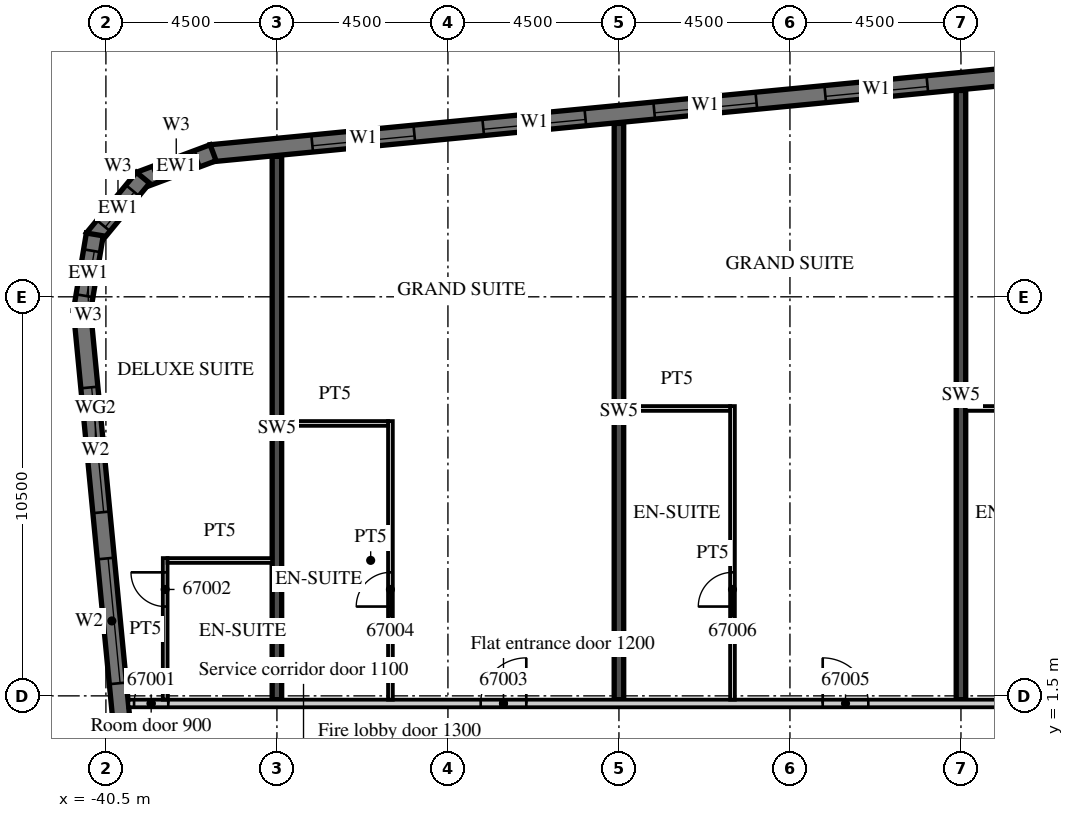
"""IFC4 building model, lengths in metres.
Left out: names, types, materials, properties, quantities, classifications, styles, units other than length and angle.
Written with IfcOpenShell. Run it as: python <this file> out.ifc"""

import sys

from ifc_helpers import new_model, si_unit, direction, frame, frame_2d, origin, place, context, subcontext, project, spatial, polyline, rectangle, outline, extrude, element, fill, save


model = new_model("IFC4")
c1 = context("Model", 3, precision=1e-05, world=origin(), true_north=direction((0.0, 1.0)))
c2 = subcontext(c1, "Body", "Model", "MODEL_VIEW")
j1 = project(units=[si_unit("LENGTHUNIT", "METRE"), si_unit("PLANEANGLEUNIT", "RADIAN")], contexts=[c1])
p1 = place(None, origin())
s1 = spatial("IfcSite", under=j1, at=p1, CompositionType="ELEMENT")
p2 = place(p1, origin())
s2 = spatial("IfcBuilding", under=s1, at=p2, CompositionType="ELEMENT")
p3 = place(p2, frame((0.0, 0.0, 271.8)))
s3 = spatial("IfcBuildingStorey", under=s2, at=p3, CompositionType="ELEMENT", Elevation=271.8)
p4 = place(p3, frame((-36.0, 1.4, 0.0), z_axis=(0.0, 0.0, 1.0), x_axis=(0.0, 1.0, 0.0)))
e1 = element("IfcWall", 1, at=p4, inside=s3, PredefinedType="SHEAR", context=c2, shape_type="SweptSolid", body=[
    extrude(rectangle(XDim=14.296, YDim=0.25, at=frame_2d((7.148, 0.0))), origin(), (0.0, 0.0, 1.0), 3.3),
])
p5 = place(p3, frame((-27.0, 1.4, 0.0), z_axis=(0.0, 0.0, 1.0), x_axis=(0.0, 1.0, 0.0)))
e2 = element("IfcWall", 2, at=p5, inside=s3, PredefinedType="SHEAR", context=c2, shape_type="SweptSolid", body=[
    extrude(rectangle(XDim=15.163, YDim=0.25, at=frame_2d((7.582, 0.0))), origin(), (0.0, 0.0, 1.0), 3.3),
])
p6 = place(p3, frame((-18.0, 1.4, 0.0), z_axis=(0.0, 0.0, 1.0), x_axis=(0.0, 1.0, 0.0)))
e3 = element("IfcWall", 3, at=p6, inside=s3, PredefinedType="SHEAR", context=c2, shape_type="SweptSolid", body=[
    extrude(rectangle(XDim=16.03, YDim=0.25, at=frame_2d((8.015, 0.0))), origin(), (0.0, 0.0, 1.0), 3.3),
])
p7 = place(p3, frame((-41.132, 11.658, 0.0), z_axis=(0.0, 0.0, 1.0), x_axis=(0.095847749461, -0.995396006082, 0.0)))
e4 = element("IfcWall", 4, at=p7, inside=s3, PredefinedType="SOLIDWALL", context=c2, shape_type="SweptSolid", body=[
    extrude(rectangle(XDim=32.0, YDim=0.45, at=frame_2d((16.0, 0.0))), origin(), (0.0, 0.0, 1.0), 3.02),
])
p8 = place(p7, frame((2.053, 0.0, 0.45)))
e5 = element("IfcOpeningElement", 5, at=p8, cuts=e4, PredefinedType="OPENING", context=c2, shape_type="SweptSolid", body=[
    extrude(rectangle(XDim=3.3, YDim=2.25, at=frame_2d((1.65, 1.125))), frame((0.0, 0.235, 0.0), z_axis=(0.0, -1.0, 0.0), x_axis=(1.0, 0.0, 0.0)), (0.0, 0.0, 1.0), 0.47),
])
p9 = place(p7, frame((6.574, 0.0, 0.45)))
e6 = element("IfcOpeningElement", 6, at=p9, cuts=e4, PredefinedType="OPENING", context=c2, shape_type="SweptSolid", body=[
    extrude(rectangle(XDim=3.3, YDim=2.25, at=frame_2d((1.65, 1.125))), frame((0.0, 0.235, 0.0), z_axis=(0.0, -1.0, 0.0), x_axis=(1.0, 0.0, 0.0)), (0.0, 0.0, 1.0), 0.47),
])
p10 = place(p3, frame((13.521, 20.713, 0.0), z_axis=(0.0, 0.0, 1.0), x_axis=(-0.995396277313, -0.095844932638, 0.0)))
e7 = element("IfcWall", 7, at=p10, inside=s3, PredefinedType="SOLIDWALL", context=c2, shape_type="SweptSolid", body=[
    extrude(rectangle(XDim=51.495, YDim=0.45, at=frame_2d((25.748, 0.0))), origin(), (0.0, 0.0, 1.0), 3.02),
])
p11 = place(p10, frame((0.91, 0.0, 0.45)))
e8 = element("IfcOpeningElement", 8, at=p11, cuts=e7, PredefinedType="OPENING", context=c2, shape_type="SweptSolid", body=[
    extrude(rectangle(XDim=2.7, YDim=2.25, at=frame_2d((1.35, 1.125))), frame((0.0, 0.235, 0.0), z_axis=(0.0, -1.0, 0.0), x_axis=(1.0, 0.0, 0.0)), (0.0, 0.0, 1.0), 0.47),
])
p12 = place(p10, frame((5.431, 0.0, 0.45)))
e9 = element("IfcOpeningElement", 9, at=p12, cuts=e7, PredefinedType="OPENING", context=c2, shape_type="SweptSolid", body=[
    extrude(rectangle(XDim=2.7, YDim=2.25, at=frame_2d((1.35, 1.125))), frame((0.0, 0.235, 0.0), z_axis=(0.0, -1.0, 0.0), x_axis=(1.0, 0.0, 0.0)), (0.0, 0.0, 1.0), 0.47),
])
p13 = place(p10, frame((9.952, 0.0, 0.45)))
e10 = element("IfcOpeningElement", 10, at=p13, cuts=e7, PredefinedType="OPENING", context=c2, shape_type="SweptSolid", body=[
    extrude(rectangle(XDim=2.7, YDim=2.25, at=frame_2d((1.35, 1.125))), frame((0.0, 0.235, 0.0), z_axis=(0.0, -1.0, 0.0), x_axis=(1.0, 0.0, 0.0)), (0.0, 0.0, 1.0), 0.47),
])
p14 = place(p10, frame((14.473, 0.0, 0.45)))
e11 = element("IfcOpeningElement", 11, at=p14, cuts=e7, PredefinedType="OPENING", context=c2, shape_type="SweptSolid", body=[
    extrude(rectangle(XDim=2.7, YDim=2.25, at=frame_2d((1.35, 1.125))), frame((0.0, 0.235, 0.0), z_axis=(0.0, -1.0, 0.0), x_axis=(1.0, 0.0, 0.0)), (0.0, 0.0, 1.0), 0.47),
])
p15 = place(p10, frame((18.994, 0.0, 0.45)))
e12 = element("IfcOpeningElement", 12, at=p15, cuts=e7, PredefinedType="OPENING", context=c2, shape_type="SweptSolid", body=[
    extrude(rectangle(XDim=2.7, YDim=2.25, at=frame_2d((1.35, 1.125))), frame((0.0, 0.235, 0.0), z_axis=(0.0, -1.0, 0.0), x_axis=(1.0, 0.0, 0.0)), (0.0, 0.0, 1.0), 0.47),
])
p16 = place(p10, frame((23.514, 0.0, 0.45)))
e13 = element("IfcOpeningElement", 13, at=p16, cuts=e7, PredefinedType="OPENING", context=c2, shape_type="SweptSolid", body=[
    extrude(rectangle(XDim=2.7, YDim=2.25, at=frame_2d((1.35, 1.125))), frame((0.0, 0.235, 0.0), z_axis=(0.0, -1.0, 0.0), x_axis=(1.0, 0.0, 0.0)), (0.0, 0.0, 1.0), 0.47),
])
p17 = place(p10, frame((28.035, 0.0, 0.45)))
e14 = element("IfcOpeningElement", 14, at=p17, cuts=e7, PredefinedType="OPENING", context=c2, shape_type="SweptSolid", body=[
    extrude(rectangle(XDim=2.7, YDim=2.25, at=frame_2d((1.35, 1.125))), frame((0.0, 0.235, 0.0), z_axis=(0.0, -1.0, 0.0), x_axis=(1.0, 0.0, 0.0)), (0.0, 0.0, 1.0), 0.47),
])
p18 = place(p10, frame((32.556, 0.0, 0.45)))
e15 = element("IfcOpeningElement", 15, at=p18, cuts=e7, PredefinedType="OPENING", context=c2, shape_type="SweptSolid", body=[
    extrude(rectangle(XDim=2.7, YDim=2.25, at=frame_2d((1.35, 1.125))), frame((0.0, 0.235, 0.0), z_axis=(0.0, -1.0, 0.0), x_axis=(1.0, 0.0, 0.0)), (0.0, 0.0, 1.0), 0.47),
])
p19 = place(p10, frame((37.077, 0.0, 0.45)))
e16 = element("IfcOpeningElement", 16, at=p19, cuts=e7, PredefinedType="OPENING", context=c2, shape_type="SweptSolid", body=[
    extrude(rectangle(XDim=2.7, YDim=2.25, at=frame_2d((1.35, 1.125))), frame((0.0, 0.235, 0.0), z_axis=(0.0, -1.0, 0.0), x_axis=(1.0, 0.0, 0.0)), (0.0, 0.0, 1.0), 0.47),
])
p20 = place(p10, frame((41.598, 0.0, 0.45)))
e17 = element("IfcOpeningElement", 17, at=p20, cuts=e7, PredefinedType="OPENING", context=c2, shape_type="SweptSolid", body=[
    extrude(rectangle(XDim=2.7, YDim=2.25, at=frame_2d((1.35, 1.125))), frame((0.0, 0.235, 0.0), z_axis=(0.0, -1.0, 0.0), x_axis=(1.0, 0.0, 0.0)), (0.0, 0.0, 1.0), 0.47),
])
p21 = place(p10, frame((46.118, 0.0, 0.45)))
e18 = element("IfcOpeningElement", 18, at=p21, cuts=e7, PredefinedType="OPENING", context=c2, shape_type="SweptSolid", body=[
    extrude(rectangle(XDim=2.7, YDim=2.25, at=frame_2d((1.35, 1.125))), frame((0.0, 0.235, 0.0), z_axis=(0.0, -1.0, 0.0), x_axis=(1.0, 0.0, 0.0)), (0.0, 0.0, 1.0), 0.47),
])
p22 = place(p3, frame((-37.679, 15.791, 0.0), z_axis=(0.0, 0.0, 1.0), x_axis=(-0.936677599948, -0.350192909346, 0.0)))
e19 = element("IfcWall", 19, at=p22, inside=s3, PredefinedType="SOLIDWALL", context=c2, shape_type="SweptSolid", body=[
    extrude(outline(polyline([(0.0, -0.225), (2.071, -0.225), (1.95, 0.225), (0.121, 0.225), (0.0, -0.225)])), origin(), (0.0, 0.0, 1.0), 3.02),
])
p23 = place(p22, frame((0.435, 0.0, 0.45)))
e20 = element("IfcOpeningElement", 20, at=p23, cuts=e19, PredefinedType="OPENING", context=c2, shape_type="SweptSolid", body=[
    extrude(rectangle(XDim=1.2, YDim=2.25, at=frame_2d((0.6, 1.125))), frame((0.0, 0.235, 0.0), z_axis=(0.0, -1.0, 0.0), x_axis=(1.0, 0.0, 0.0)), (0.0, 0.0, 1.0), 0.47),
])
p24 = place(p3, frame((-39.524, 15.133, 0.0), z_axis=(0.0, 0.0, 1.0), x_axis=(-0.636046112757, -0.771651049663, 0.0)))
e21 = element("IfcWall", 21, at=p24, inside=s3, PredefinedType="SOLIDWALL", context=c2, shape_type="SweptSolid", body=[
    extrude(outline(polyline([(0.0, -0.225), (2.071, -0.225), (1.95, 0.225), (0.121, 0.225), (0.0, -0.225)])), origin(), (0.0, 0.0, 1.0), 3.02),
])
p25 = place(p24, frame((0.435, 0.0, 0.45)))
e22 = element("IfcOpeningElement", 22, at=p25, cuts=e21, PredefinedType="OPENING", context=c2, shape_type="SweptSolid", body=[
    extrude(rectangle(XDim=1.2, YDim=2.25, at=frame_2d((0.6, 1.125))), frame((0.0, 0.235, 0.0), z_axis=(0.0, -1.0, 0.0), x_axis=(1.0, 0.0, 0.0)), (0.0, 0.0, 1.0), 0.47),
])
p26 = place(p3, frame((-40.792, 13.641, 0.0), z_axis=(0.0, 0.0, 1.0), x_axis=(-0.165068144653, -0.986282164302, 0.0)))
e23 = element("IfcWall", 23, at=p26, inside=s3, PredefinedType="SOLIDWALL", context=c2, shape_type="SweptSolid", body=[
    extrude(outline(polyline([(0.0, -0.225), (2.071, -0.225), (1.95, 0.225), (0.121, 0.225), (0.0, -0.225)])), origin(), (0.0, 0.0, 1.0), 3.02),
])
p27 = place(p26, frame((0.435, 0.0, 0.45)))
e24 = element("IfcOpeningElement", 24, at=p27, cuts=e23, PredefinedType="OPENING", context=c2, shape_type="SweptSolid", body=[
    extrude(rectangle(XDim=1.2, YDim=2.25, at=frame_2d((0.6, 1.125))), frame((0.0, 0.235, 0.0), z_axis=(0.0, -1.0, 0.0), x_axis=(1.0, 0.0, 0.0)), (0.0, 0.0, 1.0), 0.47),
])
p28 = place(p3, frame((-39.909, 1.3, 0.0), z_axis=(0.0, 0.0, 1.0), x_axis=(1.0, 0.0, 0.0)))
e25 = element("IfcWall", 25, at=p28, inside=s3, PredefinedType="PARTITIONING", context=c2, shape_type="SweptSolid", body=[
    extrude(rectangle(XDim=53.409, YDim=0.2, at=frame_2d((26.705, 0.0))), origin(), (0.0, 0.0, 1.0), 3.02),
])
p29 = place(p28, frame((0.15, 0.0, 0.0)))
e26 = element("IfcOpeningElement", 26, at=p29, cuts=e25, PredefinedType="OPENING", context=c2, shape_type="SweptSolid", body=[
    extrude(rectangle(XDim=0.9, YDim=2.1, at=frame_2d((0.45, 1.05))), frame((0.0, 0.11, 0.0), z_axis=(0.0, -1.0, 0.0), x_axis=(1.0, 0.0, 0.0)), (0.0, 0.0, 1.0), 0.22),
])
p30 = place(p28, frame((9.271, 0.0, 0.0)))
e27 = element("IfcOpeningElement", 27, at=p30, cuts=e25, PredefinedType="OPENING", context=c2, shape_type="SweptSolid", body=[
    extrude(rectangle(XDim=1.2, YDim=2.1, at=frame_2d((0.6, 1.05))), frame((0.0, 0.11, 0.0), z_axis=(0.0, -1.0, 0.0), x_axis=(1.0, 0.0, 0.0)), (0.0, 0.0, 1.0), 0.22),
])
p31 = place(p28, frame((18.271, 0.0, 0.0)))
e28 = element("IfcOpeningElement", 28, at=p31, cuts=e25, PredefinedType="OPENING", context=c2, shape_type="SweptSolid", body=[
    extrude(rectangle(XDim=1.2, YDim=2.1, at=frame_2d((0.6, 1.05))), frame((0.0, 0.11, 0.0), z_axis=(0.0, -1.0, 0.0), x_axis=(1.0, 0.0, 0.0)), (0.0, 0.0, 1.0), 0.22),
])
p32 = place(p28, frame((27.271, 0.0, 0.0)))
e29 = element("IfcOpeningElement", 29, at=p32, cuts=e25, PredefinedType="OPENING", context=c2, shape_type="SweptSolid", body=[
    extrude(rectangle(XDim=1.2, YDim=2.1, at=frame_2d((0.6, 1.05))), frame((0.0, 0.11, 0.0), z_axis=(0.0, -1.0, 0.0), x_axis=(1.0, 0.0, 0.0)), (0.0, 0.0, 1.0), 0.22),
])
p33 = place(p28, frame((36.271, 0.0, 0.0)))
e30 = element("IfcOpeningElement", 30, at=p33, cuts=e25, PredefinedType="OPENING", context=c2, shape_type="SweptSolid", body=[
    extrude(rectangle(XDim=1.2, YDim=2.1, at=frame_2d((0.6, 1.05))), frame((0.0, 0.11, 0.0), z_axis=(0.0, -1.0, 0.0), x_axis=(1.0, 0.0, 0.0)), (0.0, 0.0, 1.0), 0.22),
])
p34 = place(p28, frame((42.346, 0.0, 0.0)))
e31 = element("IfcOpeningElement", 31, at=p34, cuts=e25, PredefinedType="OPENING", context=c2, shape_type="SweptSolid", body=[
    extrude(rectangle(XDim=1.2, YDim=2.1, at=frame_2d((0.6, 1.05))), frame((0.0, 0.11, 0.0), z_axis=(0.0, -1.0, 0.0), x_axis=(1.0, 0.0, 0.0)), (0.0, 0.0, 1.0), 0.22),
])
p35 = place(p28, frame((51.834, 0.0, 0.0)))
e32 = element("IfcOpeningElement", 32, at=p35, cuts=e25, PredefinedType="OPENING", context=c2, shape_type="SweptSolid", body=[
    extrude(rectangle(XDim=1.0, YDim=2.1, at=frame_2d((0.5, 1.05))), frame((0.0, 0.11, 0.0), z_axis=(0.0, -1.0, 0.0), x_axis=(1.0, 0.0, 0.0)), (0.0, 0.0, 1.0), 0.22),
])
p36 = place(p3, frame((-38.94, 1.4, 0.0), z_axis=(0.0, 0.0, 1.0), x_axis=(0.0, 1.0, 0.0)))
e33 = element("IfcWall", 33, at=p36, inside=s3, PredefinedType="PARTITIONING", context=c2, shape_type="SweptSolid", body=[
    extrude(rectangle(XDim=3.725, YDim=0.125, at=frame_2d((1.863, 0.0))), origin(), (0.0, 0.0, 1.0), 3.02),
])
p37 = place(p36, frame((2.45, 0.0, 0.0)))
e34 = element("IfcOpeningElement", 34, at=p37, cuts=e33, PredefinedType="OPENING", context=c2, shape_type="SweptSolid", body=[
    extrude(rectangle(XDim=0.9, YDim=2.1, at=frame_2d((0.45, 1.05))), frame((0.0, 0.073, 0.0), z_axis=(0.0, -1.0, 0.0), x_axis=(1.0, 0.0, 0.0)), (0.0, 0.0, 1.0), 0.145),
])
p38 = place(p3, frame((-38.878, 5.062, 0.0), z_axis=(0.0, 0.0, 1.0), x_axis=(1.0, 0.0, 0.0)))
e35 = element("IfcWall", 35, at=p38, inside=s3, PredefinedType="PARTITIONING", context=c2, shape_type="SweptSolid", body=[
    extrude(rectangle(XDim=2.753, YDim=0.125, at=frame_2d((1.376, 0.0))), origin(), (0.0, 0.0, 1.0), 3.02),
])
p39 = place(p3, frame((-33.013, 1.4, 0.0), z_axis=(0.0, 0.0, 1.0), x_axis=(0.0, 1.0, 0.0)))
e36 = element("IfcWall", 36, at=p39, inside=s3, PredefinedType="PARTITIONING", context=c2, shape_type="SweptSolid", body=[
    extrude(rectangle(XDim=7.33, YDim=0.125, at=frame_2d((3.665, 0.0))), origin(), (0.0, 0.0, 1.0), 3.02),
])
p40 = place(p39, frame((2.45, 0.0, 0.0)))
e37 = element("IfcOpeningElement", 37, at=p40, cuts=e36, PredefinedType="OPENING", context=c2, shape_type="SweptSolid", body=[
    extrude(rectangle(XDim=0.9, YDim=2.1, at=frame_2d((0.45, 1.05))), frame((0.0, 0.073, 0.0), z_axis=(0.0, -1.0, 0.0), x_axis=(1.0, 0.0, 0.0)), (0.0, 0.0, 1.0), 0.145),
])
p41 = place(p3, frame((-35.875, 8.668, 0.0), z_axis=(0.0, 0.0, 1.0), x_axis=(1.0, 0.0, 0.0)))
e38 = element("IfcWall", 38, at=p41, inside=s3, PredefinedType="PARTITIONING", context=c2, shape_type="SweptSolid", body=[
    extrude(rectangle(XDim=2.8, YDim=0.125, at=frame_2d((1.4, 0.0))), origin(), (0.0, 0.0, 1.0), 3.02),
])
p42 = place(p3, frame((-24.012, 1.4, 0.0), z_axis=(0.0, 0.0, 1.0), x_axis=(0.0, 1.0, 0.0)))
e39 = element("IfcWall", 39, at=p42, inside=s3, PredefinedType="PARTITIONING", context=c2, shape_type="SweptSolid", body=[
    extrude(rectangle(XDim=7.725, YDim=0.125, at=frame_2d((3.863, 0.0))), origin(), (0.0, 0.0, 1.0), 3.02),
])
p43 = place(p42, frame((2.45, 0.0, 0.0)))
e40 = element("IfcOpeningElement", 40, at=p43, cuts=e39, PredefinedType="OPENING", context=c2, shape_type="SweptSolid", body=[
    extrude(rectangle(XDim=0.9, YDim=2.1, at=frame_2d((0.45, 1.05))), frame((0.0, 0.073, 0.0), z_axis=(0.0, -1.0, 0.0), x_axis=(1.0, 0.0, 0.0)), (0.0, 0.0, 1.0), 0.145),
])
for number, where, z_axis, x_axis in (
    (41, (-26.875, 9.062, 0.0), (0.0, 0.0, 1.0), (1.0, 0.0, 0.0)),
    (42, (-17.875, 9.062, 0.0), (0.0, 0.0, 1.0), (1.0, 0.0, 0.0)),
):
    element("IfcWall", number, at=place(p3, frame(where, z_axis=z_axis, x_axis=x_axis)), inside=s3, PredefinedType="PARTITIONING", context=c2, shape_type="SweptSolid", body=[
        extrude(rectangle(XDim=2.8, YDim=0.125, at=frame_2d((1.4, 0.0))), origin(), (0.0, 0.0, 1.0), 3.02),
    ])
p44 = place(p8, origin())
e43 = element("IfcWindow", 43, at=p44, inside=s3, PartitioningType="SINGLE_PANEL", PredefinedType="WINDOW", context=c2, shape_type="SweptSolid", body=[
    extrude(rectangle(XDim=3.3, YDim=2.25, at=frame_2d((1.65, 1.125))), frame((0.0, 0.09, 0.0), z_axis=(0.0, -1.0, 0.0), x_axis=(1.0, 0.0, 0.0)), (0.0, 0.0, 1.0), 0.06),
])
fill(e5, e43)
p45 = place(p9, origin())
e44 = element("IfcWindow", 44, at=p45, inside=s3, PartitioningType="SINGLE_PANEL", PredefinedType="WINDOW", context=c2, shape_type="SweptSolid", body=[
    extrude(rectangle(XDim=3.3, YDim=2.25, at=frame_2d((1.65, 1.125))), frame((0.0, 0.09, 0.0), z_axis=(0.0, -1.0, 0.0), x_axis=(1.0, 0.0, 0.0)), (0.0, 0.0, 1.0), 0.06),
])
fill(e6, e44)
p46 = place(p18, origin())
e45 = element("IfcWindow", 45, at=p46, inside=s3, PartitioningType="SINGLE_PANEL", PredefinedType="WINDOW", context=c2, shape_type="SweptSolid", body=[
    extrude(rectangle(XDim=2.7, YDim=2.25, at=frame_2d((1.35, 1.125))), frame((0.0, 0.09, 0.0), z_axis=(0.0, -1.0, 0.0), x_axis=(1.0, 0.0, 0.0)), (0.0, 0.0, 1.0), 0.06),
])
fill(e15, e45)
p47 = place(p19, origin())
e46 = element("IfcWindow", 46, at=p47, inside=s3, PartitioningType="SINGLE_PANEL", PredefinedType="WINDOW", context=c2, shape_type="SweptSolid", body=[
    extrude(rectangle(XDim=2.7, YDim=2.25, at=frame_2d((1.35, 1.125))), frame((0.0, 0.09, 0.0), z_axis=(0.0, -1.0, 0.0), x_axis=(1.0, 0.0, 0.0)), (0.0, 0.0, 1.0), 0.06),
])
fill(e16, e46)
p48 = place(p20, origin())
e47 = element("IfcWindow", 47, at=p48, inside=s3, PartitioningType="SINGLE_PANEL", PredefinedType="WINDOW", context=c2, shape_type="SweptSolid", body=[
    extrude(rectangle(XDim=2.7, YDim=2.25, at=frame_2d((1.35, 1.125))), frame((0.0, 0.09, 0.0), z_axis=(0.0, -1.0, 0.0), x_axis=(1.0, 0.0, 0.0)), (0.0, 0.0, 1.0), 0.06),
])
fill(e17, e47)
p49 = place(p21, origin())
e48 = element("IfcWindow", 48, at=p49, inside=s3, PartitioningType="SINGLE_PANEL", PredefinedType="WINDOW", context=c2, shape_type="SweptSolid", body=[
    extrude(rectangle(XDim=2.7, YDim=2.25, at=frame_2d((1.35, 1.125))), frame((0.0, 0.09, 0.0), z_axis=(0.0, -1.0, 0.0), x_axis=(1.0, 0.0, 0.0)), (0.0, 0.0, 1.0), 0.06),
])
fill(e18, e48)
p50 = place(p23, origin())
e49 = element("IfcWindow", 49, at=p50, inside=s3, PartitioningType="SINGLE_PANEL", PredefinedType="WINDOW", context=c2, shape_type="SweptSolid", body=[
    extrude(rectangle(XDim=1.2, YDim=2.25, at=frame_2d((0.6, 1.125))), frame((0.0, 0.09, 0.0), z_axis=(0.0, -1.0, 0.0), x_axis=(1.0, 0.0, 0.0)), (0.0, 0.0, 1.0), 0.06),
])
fill(e20, e49)
p51 = place(p25, origin())
e50 = element("IfcWindow", 50, at=p51, inside=s3, PartitioningType="SINGLE_PANEL", PredefinedType="WINDOW", context=c2, shape_type="SweptSolid", body=[
    extrude(rectangle(XDim=1.2, YDim=2.25, at=frame_2d((0.6, 1.125))), frame((0.0, 0.09, 0.0), z_axis=(0.0, -1.0, 0.0), x_axis=(1.0, 0.0, 0.0)), (0.0, 0.0, 1.0), 0.06),
])
fill(e22, e50)
p52 = place(p27, origin())
e51 = element("IfcWindow", 51, at=p52, inside=s3, PartitioningType="SINGLE_PANEL", PredefinedType="WINDOW", context=c2, shape_type="SweptSolid", body=[
    extrude(rectangle(XDim=1.2, YDim=2.25, at=frame_2d((0.6, 1.125))), frame((0.0, 0.09, 0.0), z_axis=(0.0, -1.0, 0.0), x_axis=(1.0, 0.0, 0.0)), (0.0, 0.0, 1.0), 0.06),
])
fill(e24, e51)
p53 = place(p29, origin())
e52 = element("IfcDoor", 52, at=p53, inside=s3, OperationType="SINGLE_SWING_RIGHT", PredefinedType="DOOR", context=c2, shape_type="SweptSolid", body=[
    extrude(rectangle(XDim=0.9, YDim=2.1, at=frame_2d((0.45, 1.05))), frame((0.0, 0.025, 0.0), z_axis=(0.0, -1.0, 0.0), x_axis=(1.0, 0.0, 0.0)), (0.0, 0.0, 1.0), 0.05),
])
fill(e26, e52)
p54 = place(p37, origin())
e53 = element("IfcDoor", 53, at=p54, inside=s3, OperationType="SINGLE_SWING_RIGHT", PredefinedType="DOOR", context=c2, shape_type="SweptSolid", body=[
    extrude(rectangle(XDim=0.9, YDim=2.1, at=frame_2d((0.45, 1.05))), frame((0.0, 0.025, 0.0), z_axis=(0.0, -1.0, 0.0), x_axis=(1.0, 0.0, 0.0)), (0.0, 0.0, 1.0), 0.05),
])
fill(e34, e53)
p55 = place(p30, origin())
e54 = element("IfcDoor", 54, at=p55, inside=s3, OperationType="SINGLE_SWING_RIGHT", PredefinedType="DOOR", context=c2, shape_type="SweptSolid", body=[
    extrude(rectangle(XDim=1.2, YDim=2.1, at=frame_2d((0.6, 1.05))), frame((0.0, 0.025, 0.0), z_axis=(0.0, -1.0, 0.0), x_axis=(1.0, 0.0, 0.0)), (0.0, 0.0, 1.0), 0.05),
])
fill(e27, e54)
p56 = place(p40, origin())
e55 = element("IfcDoor", 55, at=p56, inside=s3, OperationType="SINGLE_SWING_LEFT", PredefinedType="DOOR", context=c2, shape_type="SweptSolid", body=[
    extrude(rectangle(XDim=0.9, YDim=2.1, at=frame_2d((0.45, 1.05))), frame((0.0, 0.025, 0.0), z_axis=(0.0, -1.0, 0.0), x_axis=(1.0, 0.0, 0.0)), (0.0, 0.0, 1.0), 0.05),
])
fill(e37, e55)
p57 = place(p31, origin())
e56 = element("IfcDoor", 56, at=p57, inside=s3, OperationType="SINGLE_SWING_LEFT", PredefinedType="DOOR", context=c2, shape_type="SweptSolid", body=[
    extrude(rectangle(XDim=1.2, YDim=2.1, at=frame_2d((0.6, 1.05))), frame((0.0, 0.025, 0.0), z_axis=(0.0, -1.0, 0.0), x_axis=(1.0, 0.0, 0.0)), (0.0, 0.0, 1.0), 0.05),
])
fill(e28, e56)
p58 = place(p43, origin())
e57 = element("IfcDoor", 57, at=p58, inside=s3, OperationType="SINGLE_SWING_LEFT", PredefinedType="DOOR", context=c2, shape_type="SweptSolid", body=[
    extrude(rectangle(XDim=0.9, YDim=2.1, at=frame_2d((0.45, 1.05))), frame((0.0, 0.025, 0.0), z_axis=(0.0, -1.0, 0.0), x_axis=(1.0, 0.0, 0.0)), (0.0, 0.0, 1.0), 0.05),
])
fill(e40, e57)
save(model, sys.argv[1])
